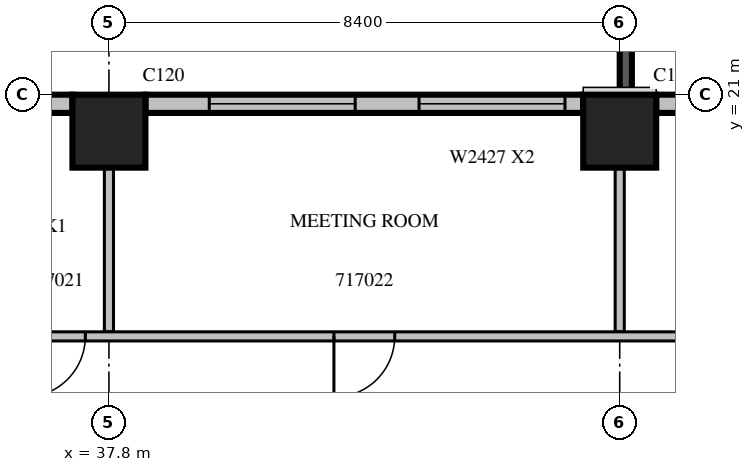
"""IFC4 building model, lengths in metres.
Left out: names, types, materials, properties, quantities, classifications, styles, units other than length and angle.
Written with IfcOpenShell. Run it as: python <this file> out.ifc"""

import sys

from ifc_helpers import new_model, si_unit, direction, frame, frame_2d, origin, origin_2d, place, context, subcontext, project, spatial, rectangle, extrude, source, transform, mapped, element, fill, save


model = new_model("IFC4")
c1 = context("Model", 3, precision=1e-05, world=origin(), true_north=direction((0.0, 1.0)))
c2 = subcontext(c1, "Body", "Model", "MODEL_VIEW")
j1 = project(units=[si_unit("LENGTHUNIT", "METRE"), si_unit("PLANEANGLEUNIT", "RADIAN")], contexts=[c1])
p1 = place(None, origin())
s1 = spatial("IfcSite", under=j1, at=p1, CompositionType="ELEMENT")
p2 = place(p1, origin())
s2 = spatial("IfcBuilding", under=s1, at=p2, CompositionType="ELEMENT")
p3 = place(p2, frame((0.0, 0.0, 82.5)))
s3 = spatial("IfcBuildingStorey", under=s2, at=p3, CompositionType="ELEMENT", Elevation=82.5)
m1 = source(origin(), c2, "Body", "SweptSolid", [
    extrude(rectangle(XDim=1.2, YDim=1.2, at=origin_2d()), origin(), (0.0, 0.0, 1.0), 4.2),
])
for number, where, z_axis, x_axis in (
    (1, (37.8, 20.4, 0.0), (0.0, 0.0, 1.0), (1.0, 0.0, 0.0)),
    (2, (46.2, 20.4, 0.0), (0.0, 0.0, 1.0), (1.0, 0.0, 0.0)),
):
    element("IfcColumn", number, at=place(p3, frame(where, z_axis=z_axis, x_axis=x_axis)), inside=s3, PredefinedType="COLUMN", context=c2, shape_type="MappedRepresentation", body=[
        mapped(m1, transform((0.0, 0.0, 0.0), scale=1.0)),
    ])
m2 = source(origin(), c2, "Body", "SweptSolid", [
    extrude(rectangle(XDim=3.9, YDim=0.2, at=frame_2d((1.95, 0.0))), origin(), (0.0, 0.0, 1.0), 3.8),
])
p4 = place(p3, frame((46.3, 21.0, 0.0), z_axis=(0.0, 0.0, 1.0), x_axis=(0.0, 1.0, 0.0)))
e3 = element("IfcWall", 3, at=p4, inside=s3, PredefinedType="SOLIDWALL", context=c2, shape_type="MappedRepresentation", body=[
    mapped(m2, transform((0.0, 0.0, 0.0), scale=1.0)),
])
m3 = source(origin(), c2, "Body", "SweptSolid", [
    extrude(rectangle(XDim=2.4, YDim=2.7, at=frame_2d((1.2, 1.35))), frame((0.0, 0.11, 0.0), z_axis=(0.0, -1.0, 0.0), x_axis=(1.0, 0.0, 0.0)), (0.0, 0.0, 1.0), 0.22),
])
p5 = place(p4, frame((0.75, 0.0, 0.6)))
e4 = element("IfcOpeningElement", 4, at=p5, cuts=e3, PredefinedType="OPENING", context=c2, shape_type="MappedRepresentation", body=[
    mapped(m3, transform((0.0, 0.0, 0.0), scale=1.0)),
])
m4 = source(origin(), c2, "Body", "SweptSolid", [
    extrude(rectangle(XDim=4.68, YDim=0.3, at=frame_2d((2.34, 0.0))), origin(), (0.0, 0.0, 1.0), 3.8),
])
p6 = place(p3, frame((51.48, 20.85, 0.0), z_axis=(0.0, 0.0, 1.0), x_axis=(-1.0, 0.0, 0.0)))
e5 = element("IfcWall", 5, at=p6, inside=s3, PredefinedType="STANDARD", context=c2, shape_type="MappedRepresentation", body=[
    mapped(m4, transform((0.0, 0.0, 0.0), scale=1.0)),
])
m5 = source(origin(), c2, "Body", "SweptSolid", [
    extrude(rectangle(XDim=1.0, YDim=2.1, at=frame_2d((0.5, 1.05))), frame((0.0, 0.16, 0.0), z_axis=(0.0, -1.0, 0.0), x_axis=(1.0, 0.0, 0.0)), (0.0, 0.0, 1.0), 0.32),
])
p7 = place(p6, frame((1.887, 0.0, 0.0)))
e6 = element("IfcOpeningElement", 6, at=p7, cuts=e5, PredefinedType="OPENING", context=c2, shape_type="MappedRepresentation", body=[
    mapped(m5, transform((0.0, 0.0, 0.0), scale=1.0)),
])
m6 = source(origin(), c2, "Body", "SweptSolid", [
    extrude(rectangle(XDim=7.2, YDim=0.3, at=frame_2d((3.6, 0.0))), origin(), (0.0, 0.0, 1.0), 3.8),
])
p8 = place(p3, frame((45.6, 20.85, 0.0), z_axis=(0.0, 0.0, 1.0), x_axis=(-1.0, 0.0, 0.0)))
e7 = element("IfcWall", 7, at=p8, inside=s3, PredefinedType="STANDARD", context=c2, shape_type="MappedRepresentation", body=[
    mapped(m6, transform((0.0, 0.0, 0.0), scale=1.0)),
])
m7 = source(origin(), c2, "Body", "SweptSolid", [
    extrude(rectangle(XDim=2.4, YDim=2.7, at=frame_2d((1.2, 1.35))), frame((0.0, 0.16, 0.0), z_axis=(0.0, -1.0, 0.0), x_axis=(1.0, 0.0, 0.0)), (0.0, 0.0, 1.0), 0.32),
])
p9 = place(p8, frame((0.3, 0.0, 0.6)))
e8 = element("IfcOpeningElement", 8, at=p9, cuts=e7, PredefinedType="OPENING", context=c2, shape_type="MappedRepresentation", body=[
    mapped(m7, transform((0.0, 0.0, 0.0), scale=1.0)),
])
p10 = place(p8, frame((3.75, 0.0, 0.6)))
e9 = element("IfcOpeningElement", 9, at=p10, cuts=e7, PredefinedType="OPENING", context=c2, shape_type="MappedRepresentation", body=[
    mapped(m7, transform((0.0, 0.0, 0.0), scale=1.0)),
])
p11 = place(p3, frame((37.2, 20.85, 0.0), z_axis=(0.0, 0.0, 1.0), x_axis=(-1.0, 0.0, 0.0)))
e10 = element("IfcWall", 10, at=p11, inside=s3, PredefinedType="STANDARD", context=c2, shape_type="MappedRepresentation", body=[
    mapped(m6, transform((0.0, 0.0, 0.0), scale=1.0)),
])
p12 = place(p11, frame((5.06, 0.0, 0.0)))
e11 = element("IfcOpeningElement", 11, at=p12, cuts=e10, PredefinedType="OPENING", context=c2, shape_type="MappedRepresentation", body=[
    mapped(m5, transform((0.0, 0.0, 0.0), scale=1.0)),
])
m8 = source(origin(), c2, "Body", "SweptSolid", [
    extrude(rectangle(XDim=2.701, YDim=0.15, at=frame_2d((1.351, 0.0))), origin(), (0.0, 0.0, 1.0), 3.8),
])
for number, where, z_axis, x_axis in (
    (12, (37.8, 17.1, 0.0), (0.0, 0.0, 1.0), (0.0, 1.0, 0.0)),
    (13, (46.2, 17.1, 0.0), (0.0, 0.0, 1.0), (0.0, 1.0, 0.0)),
):
    element("IfcWall", number, at=place(p3, frame(where, z_axis=z_axis, x_axis=x_axis)), inside=s3, PredefinedType="PARTITIONING", context=c2, shape_type="MappedRepresentation", body=[
        mapped(m8, transform((0.0, 0.0, 0.0), scale=1.0)),
    ])
m9 = source(origin(), c2, "Body", "SweptSolid", [
    extrude(rectangle(XDim=37.5, YDim=0.15, at=frame_2d((18.75, 0.0))), origin(), (0.0, 0.0, 1.0), 3.8),
])
p13 = place(p3, frame((29.4, 17.025, 0.0), z_axis=(0.0, 0.0, 1.0), x_axis=(1.0, 0.0, 0.0)))
e14 = element("IfcWall", 14, at=p13, inside=s3, PredefinedType="PARTITIONING", context=c2, shape_type="MappedRepresentation", body=[
    mapped(m9, transform((0.0, 0.0, 0.0), scale=1.0)),
])
m10 = source(origin(), c2, "Body", "SweptSolid", [
    extrude(rectangle(XDim=1.0, YDim=2.1, at=frame_2d((0.5, 1.05))), frame((0.0, 0.085, 0.0), z_axis=(0.0, -1.0, 0.0), x_axis=(1.0, 0.0, 0.0)), (0.0, 0.0, 1.0), 0.17),
])
p14 = place(p13, frame((1.357, 0.0, 0.0)))
e15 = element("IfcOpeningElement", 15, at=p14, cuts=e14, PredefinedType="OPENING", context=c2, shape_type="MappedRepresentation", body=[
    mapped(m10, transform((0.0, 0.0, 0.0), scale=1.0)),
])
p15 = place(p13, frame((4.669, 0.0, 0.0)))
e16 = element("IfcOpeningElement", 16, at=p15, cuts=e14, PredefinedType="OPENING", context=c2, shape_type="MappedRepresentation", body=[
    mapped(m10, transform((0.0, 0.0, 0.0), scale=1.0)),
])
p16 = place(p13, frame((7.012, 0.0, 0.0)))
e17 = element("IfcOpeningElement", 17, at=p16, cuts=e14, PredefinedType="OPENING", context=c2, shape_type="MappedRepresentation", body=[
    mapped(m10, transform((0.0, 0.0, 0.0), scale=1.0)),
])
p17 = place(p13, frame((12.1, 0.0, 0.0)))
e18 = element("IfcOpeningElement", 18, at=p17, cuts=e14, PredefinedType="OPENING", context=c2, shape_type="MappedRepresentation", body=[
    mapped(m10, transform((0.0, 0.0, 0.0), scale=1.0)),
])
p18 = place(p13, frame((18.898, 0.0, 0.0)))
e19 = element("IfcOpeningElement", 19, at=p18, cuts=e14, PredefinedType="OPENING", context=c2, shape_type="MappedRepresentation", body=[
    mapped(m10, transform((0.0, 0.0, 0.0), scale=1.0)),
])
p19 = place(p13, frame((23.543, 0.0, 0.0)))
e20 = element("IfcOpeningElement", 20, at=p19, cuts=e14, PredefinedType="OPENING", context=c2, shape_type="MappedRepresentation", body=[
    mapped(m10, transform((0.0, 0.0, 0.0), scale=1.0)),
])
p20 = place(p13, frame((26.826, 0.0, 0.0)))
e21 = element("IfcOpeningElement", 21, at=p20, cuts=e14, PredefinedType="OPENING", context=c2, shape_type="MappedRepresentation", body=[
    mapped(m10, transform((0.0, 0.0, 0.0), scale=1.0)),
])
m11 = source(origin(), c2, "Body", "SweptSolid", [
    extrude(rectangle(XDim=1.2, YDim=2.1, at=frame_2d((0.6, 1.05))), frame((0.0, 0.085, 0.0), z_axis=(0.0, -1.0, 0.0), x_axis=(1.0, 0.0, 0.0)), (0.0, 0.0, 1.0), 0.17),
])
p21 = place(p13, frame((30.214, 0.0, 0.0)))
e22 = element("IfcOpeningElement", 22, at=p21, cuts=e14, PredefinedType="OPENING", context=c2, shape_type="MappedRepresentation", body=[
    mapped(m11, transform((0.0, 0.0, 0.0), scale=1.0)),
])
p22 = place(p13, frame((34.721, 0.0, 0.0)))
e23 = element("IfcOpeningElement", 23, at=p22, cuts=e14, PredefinedType="OPENING", context=c2, shape_type="MappedRepresentation", body=[
    mapped(m11, transform((0.0, 0.0, 0.0), scale=1.0)),
])
m12 = source(origin(), c2, "Body", "SweptSolid", [
    extrude(rectangle(XDim=2.4, YDim=2.7, at=frame_2d((1.2, 1.35))), frame((0.0, 0.03, 0.0), z_axis=(0.0, -1.0, 0.0), x_axis=(1.0, 0.0, 0.0)), (0.0, 0.0, 1.0), 0.06),
])
p23 = place(p9, origin())
e24 = element("IfcWindow", 24, at=p23, inside=s3, PartitioningType="SINGLE_PANEL", PredefinedType="WINDOW", context=c2, shape_type="MappedRepresentation", body=[
    mapped(m12, transform((0.0, 0.0, 0.0), scale=1.0)),
])
fill(e8, e24)
p24 = place(p10, origin())
e25 = element("IfcWindow", 25, at=p24, inside=s3, PartitioningType="SINGLE_PANEL", PredefinedType="WINDOW", context=c2, shape_type="MappedRepresentation", body=[
    mapped(m12, transform((0.0, 0.0, 0.0), scale=1.0)),
])
fill(e9, e25)
m13 = source(origin(), c2, "Body", "SweptSolid", [
    extrude(rectangle(XDim=1.0, YDim=2.1, at=frame_2d((0.5, 1.05))), frame((0.0, 0.025, 0.0), z_axis=(0.0, -1.0, 0.0), x_axis=(1.0, 0.0, 0.0)), (0.0, 0.0, 1.0), 0.05),
])
p25 = place(p16, origin())
e26 = element("IfcDoor", 26, at=p25, inside=s3, OperationType="SINGLE_SWING_RIGHT", PredefinedType="DOOR", context=c2, shape_type="MappedRepresentation", body=[
    mapped(m13, transform((0.0, 0.0, 0.0), scale=1.0)),
])
fill(e17, e26)
p26 = place(p17, origin())
e27 = element("IfcDoor", 27, at=p26, inside=s3, OperationType="SINGLE_SWING_RIGHT", PredefinedType="DOOR", context=c2, shape_type="MappedRepresentation", body=[
    mapped(m13, transform((0.0, 0.0, 0.0), scale=1.0)),
])
fill(e18, e27)
save(model, sys.argv[1])
